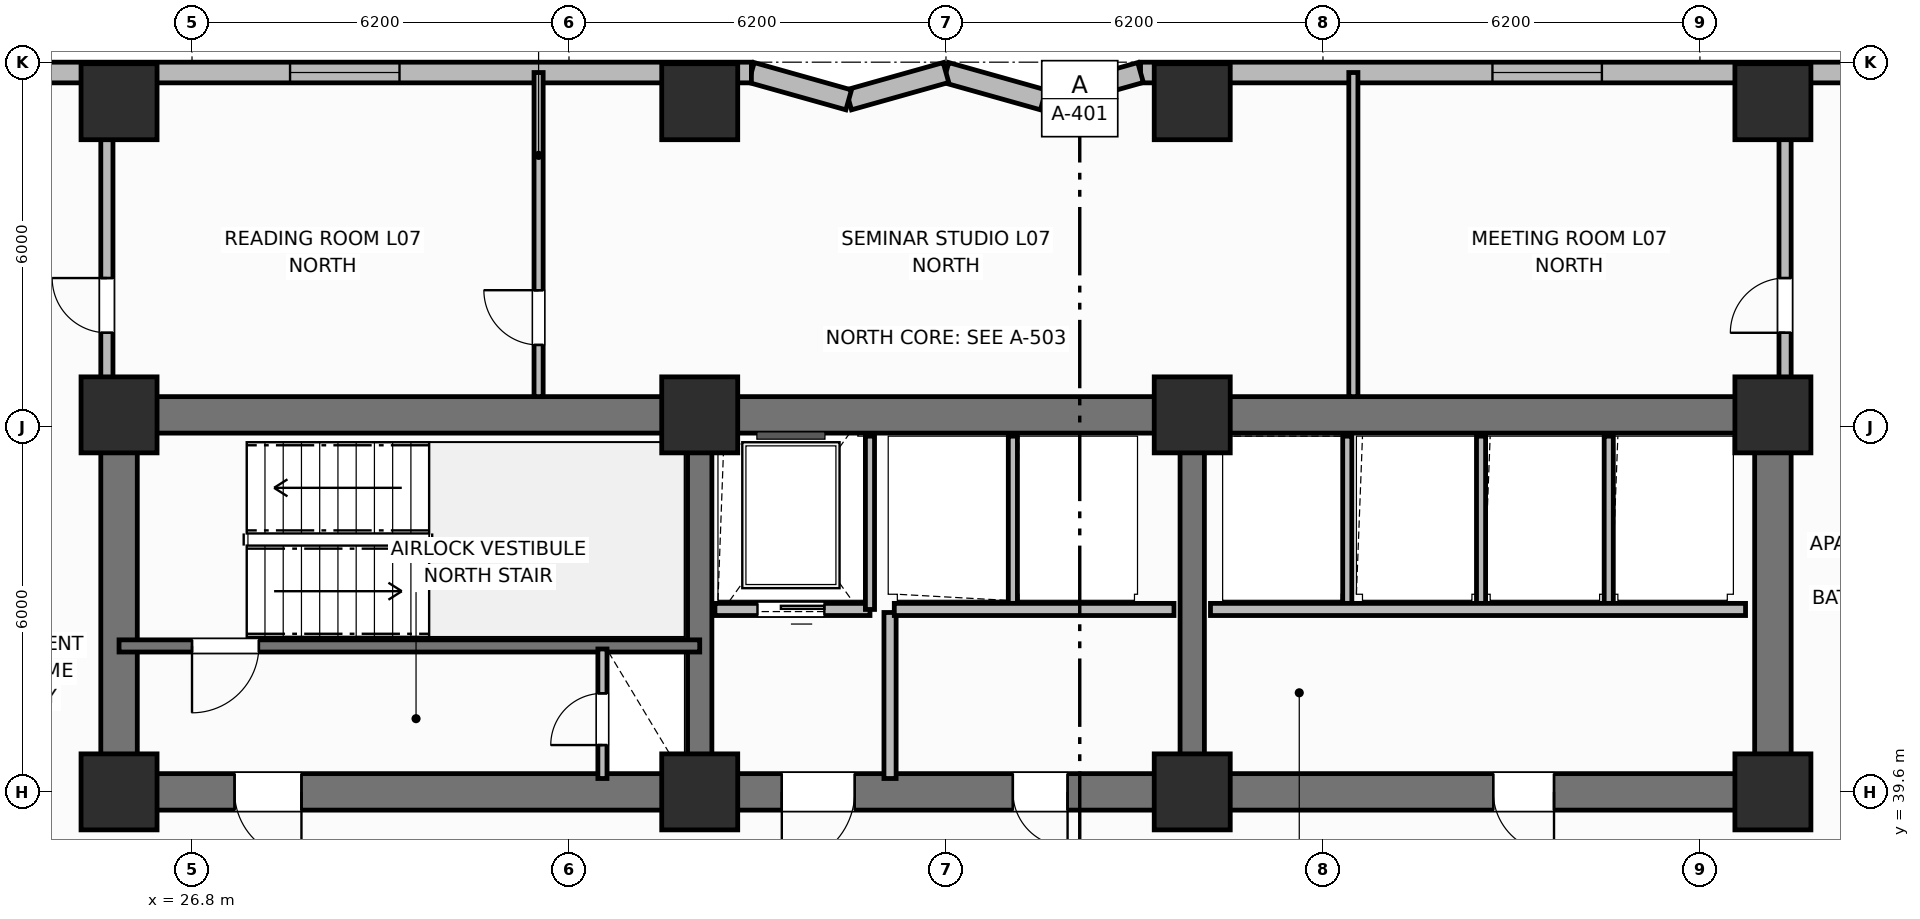
"""IFC4 building model, lengths in metres.
Left out: names, types, materials, properties, quantities, classifications, styles, units other than length and angle.
Written with IfcOpenShell. Run it as: python <this file> out.ifc"""

import sys

from ifc_helpers import new_model, si_unit, direction, frame, frame_2d, origin, origin_2d, place, context, subcontext, project, spatial, rectangle, extrude, element, fill, save


model = new_model("IFC4")
c1 = context("Model", 3, precision=1e-05, world=origin(), true_north=direction((0.0, 1.0)))
c2 = subcontext(c1, "Body", "Model", "MODEL_VIEW")
j1 = project(units=[si_unit("LENGTHUNIT", "METRE"), si_unit("PLANEANGLEUNIT", "RADIAN")], contexts=[c1])
p1 = place(None, origin())
s1 = spatial("IfcSite", under=j1, at=p1, CompositionType="ELEMENT")
p2 = place(p1, origin())
s2 = spatial("IfcBuilding", under=s1, at=p2, CompositionType="ELEMENT")
p3 = place(p2, frame((0.0, 0.0, 32.5)))
s3 = spatial("IfcBuildingStorey", under=s2, at=p3, CompositionType="ELEMENT", Elevation=32.5)
p4 = place(p3, frame((25.6, 45.8, 0.0), z_axis=(0.0, 0.0, 1.0), x_axis=(1.0, 0.0, 0.0)))
e1 = element("IfcWall", 1, at=p4, inside=s3, PredefinedType="SHEAR", context=c2, shape_type="SweptSolid", body=[
    extrude(rectangle(XDim=27.2, YDim=0.6, at=frame_2d((13.6, 0.0))), origin(), (0.0, 0.0, 1.0), 3.7),
])
for number, where, z_axis, x_axis in (
    (2, (25.6, 39.9, 0.0), (0.0, 0.0, 1.0), (0.0, 1.0, 0.0)),
    (3, (52.8, 39.9, 0.0), (0.0, 0.0, 1.0), (0.0, 1.0, 0.0)),
):
    element("IfcWall", number, at=place(p3, frame(where, z_axis=z_axis, x_axis=x_axis)), inside=s3, PredefinedType="SHEAR", context=c2, shape_type="SweptSolid", body=[
        extrude(rectangle(XDim=5.6, YDim=0.6, at=frame_2d((2.8, 0.0))), origin(), (0.0, 0.0, 1.0), 3.7),
    ])
p5 = place(p3, frame((52.8, 39.6, 0.0), z_axis=(0.0, 0.0, 1.0), x_axis=(-1.0, 0.0, 0.0)))
e4 = element("IfcWall", 4, at=p5, inside=s3, PredefinedType="SHEAR", context=c2, shape_type="SweptSolid", body=[
    extrude(rectangle(XDim=27.2, YDim=0.6, at=frame_2d((13.6, 0.0))), origin(), (0.0, 0.0, 1.0), 3.7),
])
p6 = place(p5, frame((24.2, 0.0, 0.0)))
e5 = element("IfcOpeningElement", 5, at=p6, cuts=e4, PredefinedType="OPENING", context=c2, shape_type="SweptSolid", body=[
    extrude(rectangle(XDim=1.1, YDim=2.15, at=frame_2d((0.55, 1.075))), frame((0.0, 0.31, 0.0), z_axis=(0.0, -1.0, 0.0), x_axis=(1.0, 0.0, 0.0)), (0.0, 0.0, 1.0), 0.62),
])
p7 = place(p5, frame((15.1, 0.0, 0.0)))
e6 = element("IfcOpeningElement", 6, at=p7, cuts=e4, PredefinedType="OPENING", context=c2, shape_type="SweptSolid", body=[
    extrude(rectangle(XDim=1.2, YDim=2.15, at=frame_2d((0.6, 1.075))), frame((0.0, 0.31, 0.0), z_axis=(0.0, -1.0, 0.0), x_axis=(1.0, 0.0, 0.0)), (0.0, 0.0, 1.0), 0.62),
])
p8 = place(p5, frame((11.6, 0.0, 0.0)))
e7 = element("IfcOpeningElement", 7, at=p8, cuts=e4, PredefinedType="OPENING", context=c2, shape_type="SweptSolid", body=[
    extrude(rectangle(XDim=0.9, YDim=2.1, at=frame_2d((0.45, 1.05))), frame((0.0, 0.31, 0.0), z_axis=(0.0, -1.0, 0.0), x_axis=(1.0, 0.0, 0.0)), (0.0, 0.0, 1.0), 0.62),
])
p9 = place(p5, frame((3.6, 0.0, 0.0)))
e8 = element("IfcOpeningElement", 8, at=p9, cuts=e4, PredefinedType="OPENING", context=c2, shape_type="SweptSolid", body=[
    extrude(rectangle(XDim=1.0, YDim=2.15, at=frame_2d((0.5, 1.075))), frame((0.0, 0.31, 0.0), z_axis=(0.0, -1.0, 0.0), x_axis=(1.0, 0.0, 0.0)), (0.0, 0.0, 1.0), 0.62),
])
for number, where, z_axis, x_axis in (
    (9, (35.15, 39.9, 0.0), (0.0, 0.0, 1.0), (0.0, 1.0, 0.0)),
    (10, (43.25, 39.9, 0.0), (0.0, 0.0, 1.0), (0.0, 1.0, 0.0)),
):
    element("IfcWall", number, at=place(p3, frame(where, z_axis=z_axis, x_axis=x_axis)), inside=s3, PredefinedType="SHEAR", context=c2, shape_type="SweptSolid", body=[
        extrude(rectangle(XDim=5.6, YDim=0.4, at=frame_2d((2.8, 0.0))), origin(), (0.0, 0.0, 1.0), 3.7),
    ])
for number, where, z_axis, x_axis in (
    (11, (25.6, 39.6, 0.0), (0.0, 0.0, 1.0), (1.0, 0.0, 0.0)),
    (12, (25.6, 45.8, 0.0), (0.0, 0.0, 1.0), (1.0, 0.0, 0.0)),
    (13, (35.15, 39.6, 0.0), (0.0, 0.0, 1.0), (1.0, 0.0, 0.0)),
    (14, (35.15, 45.8, 0.0), (0.0, 0.0, 1.0), (1.0, 0.0, 0.0)),
    (15, (43.25, 39.6, 0.0), (0.0, 0.0, 1.0), (1.0, 0.0, 0.0)),
    (16, (43.25, 45.8, 0.0), (0.0, 0.0, 1.0), (1.0, 0.0, 0.0)),
    (17, (52.8, 39.6, 0.0), (0.0, 0.0, 1.0), (1.0, 0.0, 0.0)),
    (18, (52.8, 45.8, 0.0), (0.0, 0.0, 1.0), (1.0, 0.0, 0.0)),
    (19, (25.6, 50.95, 0.0), (0.0, 0.0, 1.0), (1.0, 0.0, 0.0)),
    (20, (35.15, 50.95, 0.0), (0.0, 0.0, 1.0), (1.0, 0.0, 0.0)),
    (21, (43.25, 50.95, 0.0), (0.0, 0.0, 1.0), (1.0, 0.0, 0.0)),
    (22, (52.8, 50.95, 0.0), (0.0, 0.0, 1.0), (1.0, 0.0, 0.0)),
):
    element("IfcColumn", number, at=place(p3, frame(where, z_axis=z_axis, x_axis=x_axis)), inside=s3, PredefinedType="COLUMN", context=c2, shape_type="SweptSolid", body=[
        extrude(rectangle(XDim=1.25, YDim=1.25, at=origin_2d()), origin(), (0.0, 0.0, 1.0), 3.7),
    ])
p10 = place(p3, frame((59.8, 51.43, 0.0), z_axis=(0.0, 0.0, 1.0), x_axis=(-1.0, 0.0, 0.0)))
e23 = element("IfcWall", 23, at=p10, inside=s3, PredefinedType="SOLIDWALL", context=c2, shape_type="SweptSolid", body=[
    extrude(rectangle(XDim=17.4, YDim=0.34, at=frame_2d((8.7, 0.0))), origin(), (0.0, 0.0, 1.0), 2.7),
])
p11 = place(p10, frame((1.413, 0.0, 0.73)))
e24 = element("IfcOpeningElement", 24, at=p11, cuts=e23, PredefinedType="OPENING", context=c2, shape_type="SweptSolid", body=[
    extrude(rectangle(XDim=1.8, YDim=1.85, at=frame_2d((0.9, 0.925))), frame((0.0, 0.18, 0.0), z_axis=(0.0, -1.0, 0.0), x_axis=(1.0, 0.0, 0.0)), (0.0, 0.0, 1.0), 0.36),
])
p12 = place(p10, frame((9.812, 0.0, 0.73)))
e25 = element("IfcOpeningElement", 25, at=p12, cuts=e23, PredefinedType="OPENING", context=c2, shape_type="SweptSolid", body=[
    extrude(rectangle(XDim=1.8, YDim=1.85, at=frame_2d((0.9, 0.925))), frame((0.0, 0.18, 0.0), z_axis=(0.0, -1.0, 0.0), x_axis=(1.0, 0.0, 0.0)), (0.0, 0.0, 1.0), 0.36),
])
p13 = place(p3, frame((42.4, 51.43, 0.0), z_axis=(0.0, 0.0, 1.0), x_axis=(-0.962652136636, -0.270741322725, 0.0)))
e26 = element("IfcWall", 26, at=p13, inside=s3, PredefinedType="SOLIDWALL", context=c2, shape_type="SweptSolid", body=[
    extrude(rectangle(XDim=1.662, YDim=0.34, at=frame_2d((0.831, 0.0))), origin(), (0.0, 0.0, 1.0), 2.7),
])
p14 = place(p3, frame((40.8, 50.98, 0.0), z_axis=(0.0, 0.0, 1.0), x_axis=(-0.962662902433, 0.270703040766, 0.0)))
e27 = element("IfcWall", 27, at=p14, inside=s3, PredefinedType="SOLIDWALL", context=c2, shape_type="SweptSolid", body=[
    extrude(rectangle(XDim=1.662, YDim=0.34, at=frame_2d((0.831, 0.0))), origin(), (0.0, 0.0, 1.0), 2.7),
])
p15 = place(p3, frame((39.2, 51.43, 0.0), z_axis=(0.0, 0.0, 1.0), x_axis=(-0.962652136636, -0.270741322725, 0.0)))
e28 = element("IfcWall", 28, at=p15, inside=s3, PredefinedType="SOLIDWALL", context=c2, shape_type="SweptSolid", body=[
    extrude(rectangle(XDim=1.662, YDim=0.34, at=frame_2d((0.831, 0.0))), origin(), (0.0, 0.0, 1.0), 2.7),
])
p16 = place(p3, frame((37.6, 50.98, 0.0), z_axis=(0.0, 0.0, 1.0), x_axis=(-0.962662902433, 0.270703040766, 0.0)))
e29 = element("IfcWall", 29, at=p16, inside=s3, PredefinedType="SOLIDWALL", context=c2, shape_type="SweptSolid", body=[
    extrude(rectangle(XDim=1.662, YDim=0.34, at=frame_2d((0.831, 0.0))), origin(), (0.0, 0.0, 1.0), 2.7),
])
p17 = place(p3, frame((36.0, 51.43, 0.0), z_axis=(0.0, 0.0, 1.0), x_axis=(-1.0, 0.0, 0.0)))
e30 = element("IfcWall", 30, at=p17, inside=s3, PredefinedType="SOLIDWALL", context=c2, shape_type="SweptSolid", body=[
    extrude(rectangle(XDim=17.4, YDim=0.34, at=frame_2d((8.7, 0.0))), origin(), (0.0, 0.0, 1.0), 2.7),
])
p18 = place(p17, frame((5.788, 0.0, 0.73)))
e31 = element("IfcOpeningElement", 31, at=p18, cuts=e30, PredefinedType="OPENING", context=c2, shape_type="SweptSolid", body=[
    extrude(rectangle(XDim=1.8, YDim=1.85, at=frame_2d((0.9, 0.925))), frame((0.0, 0.18, 0.0), z_axis=(0.0, -1.0, 0.0), x_axis=(1.0, 0.0, 0.0)), (0.0, 0.0, 1.0), 0.36),
])
p19 = place(p17, frame((14.188, 0.0, 0.73)))
e32 = element("IfcOpeningElement", 32, at=p19, cuts=e30, PredefinedType="OPENING", context=c2, shape_type="SweptSolid", body=[
    extrude(rectangle(XDim=1.8, YDim=1.85, at=frame_2d((0.9, 0.925))), frame((0.0, 0.18, 0.0), z_axis=(0.0, -1.0, 0.0), x_axis=(1.0, 0.0, 0.0)), (0.0, 0.0, 1.0), 0.36),
])
p20 = place(p3, frame((35.15, 42.0, 0.0), z_axis=(0.0, 0.0, 1.0), x_axis=(-1.0, 0.0, 0.0)))
e33 = element("IfcWall", 33, at=p20, inside=s3, PredefinedType="SHEAR", context=c2, shape_type="SweptSolid", body=[
    extrude(rectangle(XDim=9.55, YDim=0.2, at=frame_2d((4.775, 0.0))), origin(), (0.0, 0.0, 1.0), 3.7),
])
p21 = place(p20, frame((7.25, 0.0, 0.0)))
e34 = element("IfcOpeningElement", 34, at=p21, cuts=e33, PredefinedType="OPENING", context=c2, shape_type="SweptSolid", body=[
    extrude(rectangle(XDim=1.1, YDim=2.15, at=frame_2d((0.55, 1.075))), frame((0.0, 0.11, 0.0), z_axis=(0.0, -1.0, 0.0), x_axis=(1.0, 0.0, 0.0)), (0.0, 0.0, 1.0), 0.22),
])
p22 = place(p3, frame((33.55, 39.82, 0.0), z_axis=(0.0, 0.0, 1.0), x_axis=(0.0, 1.0, 0.0)))
e35 = element("IfcWall", 35, at=p22, inside=s3, PredefinedType="PARTITIONING", context=c2, shape_type="SweptSolid", body=[
    extrude(rectangle(XDim=2.13, YDim=0.15, at=frame_2d((1.065, 0.0))), origin(), (0.0, 0.0, 1.0), 2.53),
])
p23 = place(p22, frame((0.55, 0.0, 0.0)))
e36 = element("IfcOpeningElement", 36, at=p23, cuts=e35, PredefinedType="OPENING", context=c2, shape_type="SweptSolid", body=[
    extrude(rectangle(XDim=0.85, YDim=2.05, at=frame_2d((0.425, 1.025))), frame((0.0, 0.085, 0.0), z_axis=(0.0, -1.0, 0.0), x_axis=(1.0, 0.0, 0.0)), (0.0, 0.0, 1.0), 0.17),
])
p24 = place(p3, frame((37.95, 42.6, 0.0), z_axis=(0.0, 0.0, 1.0), x_axis=(-1.0, 0.0, 0.0)))
e37 = element("IfcWall", 37, at=p24, inside=s3, PredefinedType="PARTITIONING", context=c2, shape_type="SweptSolid", body=[
    extrude(rectangle(XDim=2.55, YDim=0.2, at=frame_2d((1.275, 0.0))), origin(), (0.0, 0.0, 1.0), 2.3),
])
p25 = place(p24, frame((0.75, 0.0, 0.0)))
e38 = element("IfcOpeningElement", 38, at=p25, cuts=e37, PredefinedType="OPENING", context=c2, shape_type="SweptSolid", body=[
    extrude(rectangle(XDim=1.1, YDim=2.15, at=frame_2d((0.55, 1.075))), frame((0.0, 0.11, 0.0), z_axis=(0.0, -1.0, 0.0), x_axis=(1.0, 0.0, 0.0)), (0.0, 0.0, 1.0), 0.22),
])
p26 = place(p3, frame((37.95, 42.6, 0.0), z_axis=(0.0, 0.0, 1.0), x_axis=(0.0, 1.0, 0.0)))
e39 = element("IfcWall", 39, at=p26, inside=s3, PredefinedType="PARTITIONING", context=c2, shape_type="SweptSolid", body=[
    extrude(rectangle(XDim=2.85, YDim=0.15, at=frame_2d((1.425, 0.0))), origin(), (0.0, 0.0, 1.0), 2.53),
])
p27 = place(p3, frame((38.28, 39.82, 0.0), z_axis=(0.0, 0.0, 1.0), x_axis=(0.0, 1.0, 0.0)))
e40 = element("IfcWall", 40, at=p27, inside=s3, PredefinedType="PARTITIONING", context=c2, shape_type="SweptSolid", body=[
    extrude(rectangle(XDim=2.73, YDim=0.2, at=frame_2d((1.365, 0.0))), origin(), (0.0, 0.0, 1.0), 2.53),
])
p28 = place(p3, frame((40.3, 42.65, 0.0), z_axis=(0.0, 0.0, 1.0), x_axis=(0.0, 1.0, 0.0)))
e41 = element("IfcWall", 41, at=p28, inside=s3, PredefinedType="PARTITIONING", context=c2, shape_type="SweptSolid", body=[
    extrude(rectangle(XDim=2.8, YDim=0.15, at=frame_2d((1.4, 0.0))), origin(), (0.0, 0.0, 1.0), 2.53),
])
p29 = place(p3, frame((42.95, 42.6, 0.0), z_axis=(0.0, 0.0, 1.0), x_axis=(-1.0, 0.0, 0.0)))
e42 = element("IfcWall", 42, at=p29, inside=s3, PredefinedType="PARTITIONING", context=c2, shape_type="SweptSolid", body=[
    extrude(rectangle(XDim=4.6, YDim=0.2, at=frame_2d((2.3, 0.0))), origin(), (0.0, 0.0, 1.0), 2.3),
])
for number, where, z_axis, x_axis in (
    (43, (45.8, 42.65, 0.0), (0.0, 0.0, 1.0), (0.0, 1.0, 0.0)),
    (44, (48.0, 42.65, 0.0), (0.0, 0.0, 1.0), (0.0, 1.0, 0.0)),
    (45, (50.1, 42.65, 0.0), (0.0, 0.0, 1.0), (0.0, 1.0, 0.0)),
):
    element("IfcWall", number, at=place(p3, frame(where, z_axis=z_axis, x_axis=x_axis)), inside=s3, PredefinedType="PARTITIONING", context=c2, shape_type="SweptSolid", body=[
        extrude(rectangle(XDim=2.8, YDim=0.15, at=frame_2d((1.4, 0.0))), origin(), (0.0, 0.0, 1.0), 2.53),
    ])
p30 = place(p3, frame((52.35, 42.6, 0.0), z_axis=(0.0, 0.0, 1.0), x_axis=(-1.0, 0.0, 0.0)))
e46 = element("IfcWall", 46, at=p30, inside=s3, PredefinedType="PARTITIONING", context=c2, shape_type="SweptSolid", body=[
    extrude(rectangle(XDim=8.8, YDim=0.2, at=frame_2d((4.4, 0.0))), origin(), (0.0, 0.0, 1.0), 2.53),
])
p31 = place(p3, frame((32.5, 46.1, 0.0), z_axis=(0.0, 0.0, 1.0), x_axis=(0.0, 1.0, 0.0)))
e47 = element("IfcWall", 47, at=p31, inside=s3, PredefinedType="PARTITIONING", context=c2, shape_type="SweptSolid", body=[
    extrude(rectangle(XDim=5.33, YDim=0.15, at=frame_2d((2.665, 0.0))), origin(), (0.0, 0.0, 1.0), 2.53),
])
p32 = place(p31, frame((0.85, 0.0, 0.0)))
e48 = element("IfcOpeningElement", 48, at=p32, cuts=e47, PredefinedType="OPENING", context=c2, shape_type="SweptSolid", body=[
    extrude(rectangle(XDim=0.9, YDim=2.1, at=frame_2d((0.45, 1.05))), frame((0.0, 0.085, 0.0), z_axis=(0.0, -1.0, 0.0), x_axis=(1.0, 0.0, 0.0)), (0.0, 0.0, 1.0), 0.17),
])
p33 = place(p3, frame((45.9, 46.1, 0.0), z_axis=(0.0, 0.0, 1.0), x_axis=(0.0, 1.0, 0.0)))
e49 = element("IfcWall", 49, at=p33, inside=s3, PredefinedType="PARTITIONING", context=c2, shape_type="SweptSolid", body=[
    extrude(rectangle(XDim=5.33, YDim=0.15, at=frame_2d((2.665, 0.0))), origin(), (0.0, 0.0, 1.0), 2.53),
])
p34 = place(p3, frame((25.4, 46.1, 0.0), z_axis=(0.0, 0.0, 1.0), x_axis=(0.0, 1.0, 0.0)))
e50 = element("IfcWall", 50, at=p34, inside=s3, PredefinedType="PARTITIONING", context=c2, shape_type="SweptSolid", body=[
    extrude(rectangle(XDim=4.73, YDim=0.2, at=frame_2d((2.365, 0.0))), origin(), (0.0, 0.0, 1.0), 2.53),
])
p35 = place(p34, frame((1.05, 0.0, 0.0)))
e51 = element("IfcOpeningElement", 51, at=p35, cuts=e50, PredefinedType="OPENING", context=c2, shape_type="SweptSolid", body=[
    extrude(rectangle(XDim=0.9, YDim=2.1, at=frame_2d((0.45, 1.05))), frame((0.0, 0.11, 0.0), z_axis=(0.0, -1.0, 0.0), x_axis=(1.0, 0.0, 0.0)), (0.0, 0.0, 1.0), 0.22),
])
p36 = place(p3, frame((53.0, 46.1, 0.0), z_axis=(0.0, 0.0, 1.0), x_axis=(0.0, 1.0, 0.0)))
e52 = element("IfcWall", 52, at=p36, inside=s3, PredefinedType="PARTITIONING", context=c2, shape_type="SweptSolid", body=[
    extrude(rectangle(XDim=4.73, YDim=0.2, at=frame_2d((2.365, 0.0))), origin(), (0.0, 0.0, 1.0), 2.53),
])
p37 = place(p36, frame((1.05, 0.0, 0.0)))
e53 = element("IfcOpeningElement", 53, at=p37, cuts=e52, PredefinedType="OPENING", context=c2, shape_type="SweptSolid", body=[
    extrude(rectangle(XDim=0.9, YDim=2.1, at=frame_2d((0.45, 1.05))), frame((0.0, 0.11, 0.0), z_axis=(0.0, -1.0, 0.0), x_axis=(1.0, 0.0, 0.0)), (0.0, 0.0, 1.0), 0.22),
])
p38 = place(p12, origin())
e54 = element("IfcWindow", 54, at=p38, inside=s3, PartitioningType="SINGLE_PANEL", PredefinedType="WINDOW", context=c2, shape_type="SweptSolid", body=[
    extrude(rectangle(XDim=1.8, YDim=1.85, at=frame_2d((0.9, 0.925))), frame((0.0, 0.03, 0.0), z_axis=(0.0, -1.0, 0.0), x_axis=(1.0, 0.0, 0.0)), (0.0, 0.0, 1.0), 0.06),
])
fill(e25, e54)
p39 = place(p18, origin())
e55 = element("IfcWindow", 55, at=p39, inside=s3, PartitioningType="SINGLE_PANEL", PredefinedType="WINDOW", context=c2, shape_type="SweptSolid", body=[
    extrude(rectangle(XDim=1.8, YDim=1.85, at=frame_2d((0.9, 0.925))), frame((0.0, 0.03, 0.0), z_axis=(0.0, -1.0, 0.0), x_axis=(1.0, 0.0, 0.0)), (0.0, 0.0, 1.0), 0.06),
])
fill(e31, e55)
p40 = place(p21, origin())
e56 = element("IfcDoor", 56, at=p40, inside=s3, OperationType="SINGLE_SWING_RIGHT", PredefinedType="DOOR", context=c2, shape_type="SweptSolid", body=[
    extrude(rectangle(XDim=1.1, YDim=2.15, at=frame_2d((0.55, 1.075))), frame((0.0, 0.025, 0.0), z_axis=(0.0, -1.0, 0.0), x_axis=(1.0, 0.0, 0.0)), (0.0, 0.0, 1.0), 0.05),
])
fill(e34, e56)
p41 = place(p23, origin())
e57 = element("IfcDoor", 57, at=p41, inside=s3, OperationType="SINGLE_SWING_LEFT", PredefinedType="TRAPDOOR", context=c2, shape_type="SweptSolid", body=[
    extrude(rectangle(XDim=0.85, YDim=2.05, at=frame_2d((0.425, 1.025))), frame((0.0, 0.025, 0.0), z_axis=(0.0, -1.0, 0.0), x_axis=(1.0, 0.0, 0.0)), (0.0, 0.0, 1.0), 0.05),
])
fill(e36, e57)
p42 = place(p25, origin())
e58 = element("IfcDoor", 58, at=p42, inside=s3, OperationType="SLIDING_TO_LEFT", PredefinedType="DOOR", context=c2, shape_type="SweptSolid", body=[
    extrude(rectangle(XDim=1.1, YDim=2.15, at=frame_2d((0.55, 1.075))), frame((0.0, 0.025, 0.0), z_axis=(0.0, -1.0, 0.0), x_axis=(1.0, 0.0, 0.0)), (0.0, 0.0, 1.0), 0.05),
])
fill(e38, e58)
p43 = place(p32, origin())
e59 = element("IfcDoor", 59, at=p43, inside=s3, OperationType="SINGLE_SWING_RIGHT", PredefinedType="DOOR", context=c2, shape_type="SweptSolid", body=[
    extrude(rectangle(XDim=0.9, YDim=2.1, at=frame_2d((0.45, 1.05))), frame((0.0, 0.025, 0.0), z_axis=(0.0, -1.0, 0.0), x_axis=(1.0, 0.0, 0.0)), (0.0, 0.0, 1.0), 0.05),
])
fill(e48, e59)
p44 = place(p35, origin())
e60 = element("IfcDoor", 60, at=p44, inside=s3, OperationType="SINGLE_SWING_RIGHT", PredefinedType="DOOR", context=c2, shape_type="SweptSolid", body=[
    extrude(rectangle(XDim=0.9, YDim=2.1, at=frame_2d((0.45, 1.05))), frame((0.0, 0.025, 0.0), z_axis=(0.0, -1.0, 0.0), x_axis=(1.0, 0.0, 0.0)), (0.0, 0.0, 1.0), 0.05),
])
fill(e51, e60)
p45 = place(p37, origin())
e61 = element("IfcDoor", 61, at=p45, inside=s3, OperationType="SINGLE_SWING_LEFT", PredefinedType="DOOR", context=c2, shape_type="SweptSolid", body=[
    extrude(rectangle(XDim=0.9, YDim=2.1, at=frame_2d((0.45, 1.05))), frame((0.0, 0.025, 0.0), z_axis=(0.0, -1.0, 0.0), x_axis=(1.0, 0.0, 0.0)), (0.0, 0.0, 1.0), 0.05),
])
fill(e53, e61)
p46 = place(p6, origin())
e62 = element("IfcDoor", 62, at=p46, inside=s3, OperationType="SINGLE_SWING_LEFT", PredefinedType="DOOR", context=c2, shape_type="SweptSolid", body=[
    extrude(rectangle(XDim=1.1, YDim=2.15, at=frame_2d((0.55, 1.075))), frame((0.0, 0.025, 0.0), z_axis=(0.0, -1.0, 0.0), x_axis=(1.0, 0.0, 0.0)), (0.0, 0.0, 1.0), 0.05),
])
fill(e5, e62)
p47 = place(p7, origin())
e63 = element("IfcDoor", 63, at=p47, inside=s3, OperationType="SINGLE_SWING_RIGHT", PredefinedType="DOOR", context=c2, shape_type="SweptSolid", body=[
    extrude(rectangle(XDim=1.2, YDim=2.15, at=frame_2d((0.6, 1.075))), frame((0.0, 0.025, 0.0), z_axis=(0.0, -1.0, 0.0), x_axis=(1.0, 0.0, 0.0)), (0.0, 0.0, 1.0), 0.05),
])
fill(e6, e63)
p48 = place(p8, origin())
e64 = element("IfcDoor", 64, at=p48, inside=s3, OperationType="SINGLE_SWING_LEFT", PredefinedType="DOOR", context=c2, shape_type="SweptSolid", body=[
    extrude(rectangle(XDim=0.9, YDim=2.1, at=frame_2d((0.45, 1.05))), frame((0.0, 0.025, 0.0), z_axis=(0.0, -1.0, 0.0), x_axis=(1.0, 0.0, 0.0)), (0.0, 0.0, 1.0), 0.05),
])
fill(e7, e64)
p49 = place(p9, origin())
e65 = element("IfcDoor", 65, at=p49, inside=s3, OperationType="SINGLE_SWING_LEFT", PredefinedType="DOOR", context=c2, shape_type="SweptSolid", body=[
    extrude(rectangle(XDim=1.0, YDim=2.15, at=frame_2d((0.5, 1.075))), frame((0.0, 0.025, 0.0), z_axis=(0.0, -1.0, 0.0), x_axis=(1.0, 0.0, 0.0)), (0.0, 0.0, 1.0), 0.05),
])
fill(e8, e65)
save(model, sys.argv[1])
